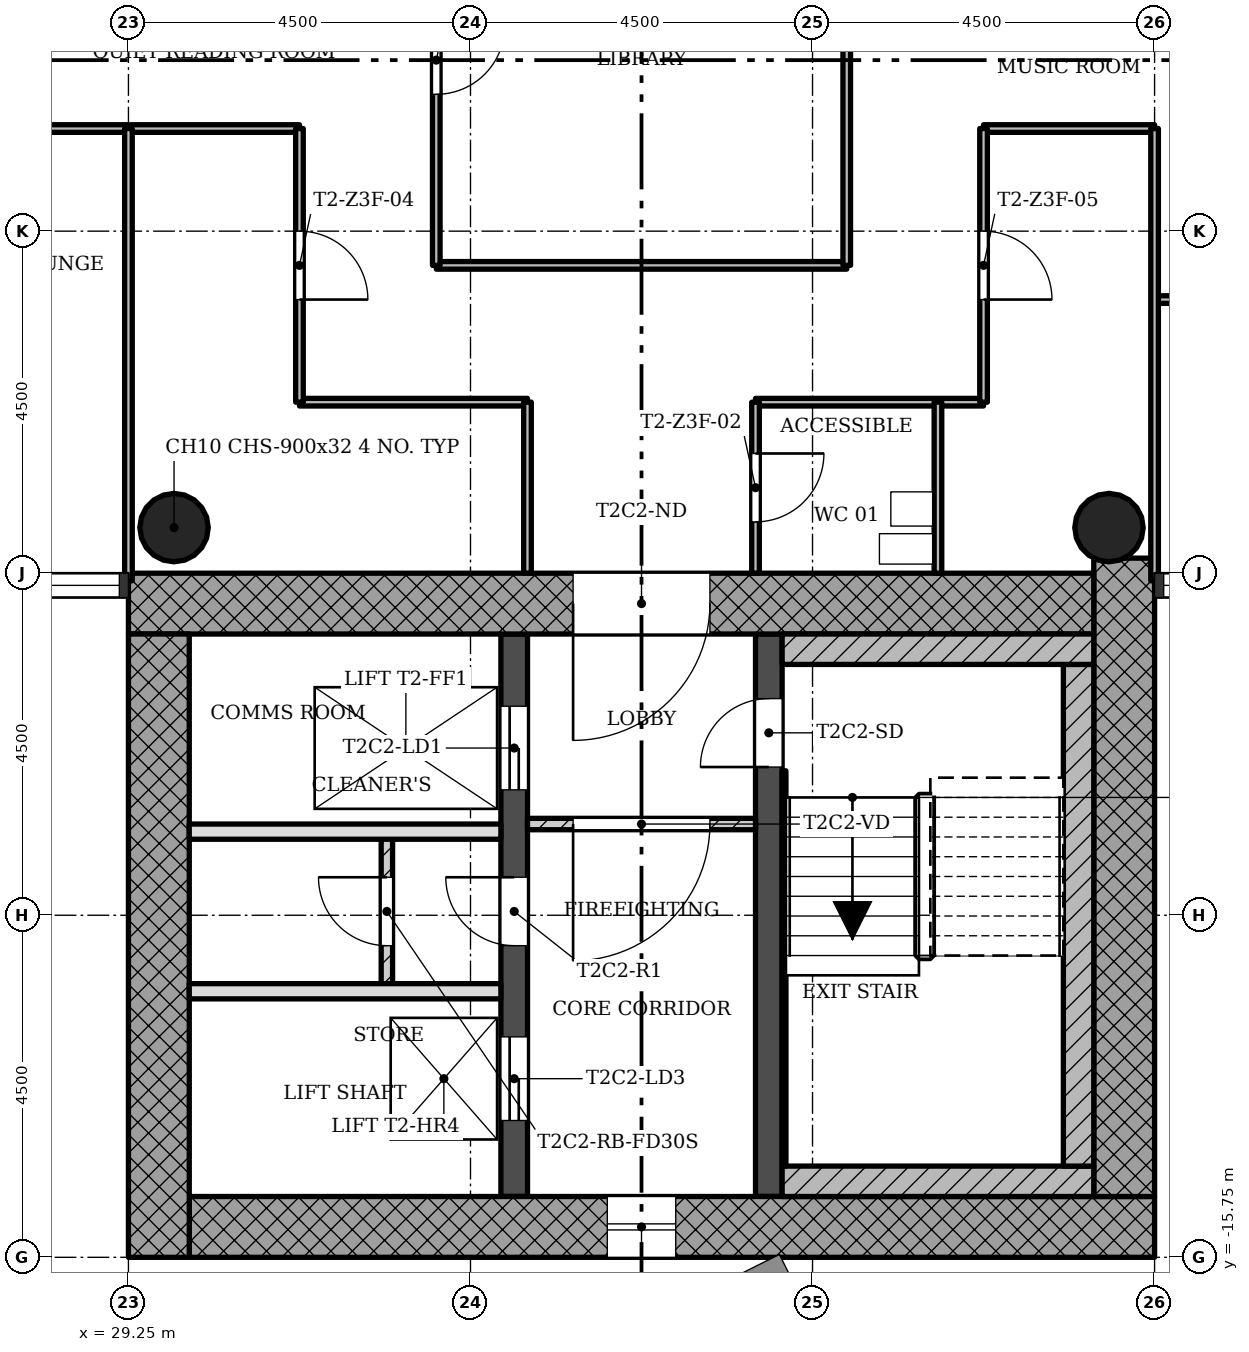
"""IFC4 building model, lengths in metres.
Left out: names, types, materials, properties, quantities, classifications, styles, units other than length and angle.
Written with IfcOpenShell. Run it as: python <this file> out.ifc"""

import sys

from ifc_helpers import new_model, si_unit, direction, frame, frame_2d, origin, origin_2d, place, context, subcontext, project, spatial, rectangle, hollow_circle, extrude, element, fill, save


model = new_model("IFC4")
c1 = context("Model", 3, precision=1e-05, world=origin(), true_north=direction((0.0, 1.0)))
c2 = subcontext(c1, "Body", "Model", "MODEL_VIEW")
j1 = project(units=[si_unit("LENGTHUNIT", "METRE"), si_unit("PLANEANGLEUNIT", "RADIAN")], contexts=[c1])
p1 = place(None, origin())
s1 = spatial("IfcSite", under=j1, at=p1, CompositionType="ELEMENT")
p2 = place(p1, origin())
s2 = spatial("IfcBuilding", under=s1, at=p2, CompositionType="ELEMENT")
p3 = place(p2, frame((0.0, 0.0, 164.3)))
s3 = spatial("IfcBuildingStorey", under=s2, at=p3, CompositionType="ELEMENT", Elevation=164.3)
p4 = place(p3, frame((30.05, -15.35, 0.0), z_axis=(0.0, 0.0, 1.0), x_axis=(1.0, 0.0, 0.0)))
e1 = element("IfcWall", 1, at=p4, inside=s3, PredefinedType="SHEAR", context=c2, shape_type="SweptSolid", body=[
    extrude(rectangle(XDim=12.7, YDim=0.8, at=frame_2d((6.35, 0.0))), origin(), (0.0, 0.0, 1.0), 3.4),
])
p5 = place(p4, frame((5.5, 0.0, 0.45)))
e2 = element("IfcOpeningElement", 2, at=p5, cuts=e1, PredefinedType="OPENING", context=c2, shape_type="SweptSolid", body=[
    extrude(rectangle(XDim=0.9, YDim=2.4, at=frame_2d((0.45, 1.2))), frame((0.0, 0.41, 0.0), z_axis=(0.0, -1.0, 0.0), x_axis=(1.0, 0.0, 0.0)), (0.0, 0.0, 1.0), 0.82),
])
p6 = place(p3, frame((42.35, -14.95, 0.0), z_axis=(0.0, 0.0, 1.0), x_axis=(0.0, 1.0, 0.0)))
e3 = element("IfcWall", 3, at=p6, inside=s3, PredefinedType="SHEAR", context=c2, shape_type="SweptSolid", body=[
    extrude(rectangle(XDim=8.398, YDim=0.8, at=frame_2d((4.199, 0.0))), origin(), (0.0, 0.0, 1.0), 3.4),
])
p7 = place(p3, frame((41.95, -7.15, 0.0), z_axis=(0.0, 0.0, 1.0), x_axis=(-1.0, 0.0, 0.0)))
e4 = element("IfcWall", 4, at=p7, inside=s3, PredefinedType="SHEAR", context=c2, shape_type="SweptSolid", body=[
    extrude(rectangle(XDim=12.7, YDim=0.8, at=frame_2d((6.35, 0.0))), origin(), (0.0, 0.0, 1.0), 3.4),
])
p8 = place(p7, frame((5.05, 0.0, 0.0)))
e5 = element("IfcOpeningElement", 5, at=p8, cuts=e4, PredefinedType="OPENING", context=c2, shape_type="SweptSolid", body=[
    extrude(rectangle(XDim=1.8, YDim=2.1, at=frame_2d((0.9, 1.05))), frame((0.0, 0.41, 0.0), z_axis=(0.0, -1.0, 0.0), x_axis=(1.0, 0.0, 0.0)), (0.0, 0.0, 1.0), 0.82),
])
p9 = place(p3, frame((29.65, -7.55, 0.0), z_axis=(0.0, 0.0, 1.0), x_axis=(0.0, -1.0, 0.0)))
e6 = element("IfcWall", 6, at=p9, inside=s3, PredefinedType="SHEAR", context=c2, shape_type="SweptSolid", body=[
    extrude(rectangle(XDim=8.2, YDim=0.8, at=frame_2d((4.1, 0.0))), origin(), (0.0, 0.0, 1.0), 3.4),
])
p10 = place(p3, frame((34.325, -14.95, 0.0), z_axis=(0.0, 0.0, 1.0), x_axis=(0.0, 1.0, 0.0)))
e7 = element("IfcWall", 7, at=p10, inside=s3, PredefinedType="SHEAR", context=c2, shape_type="SweptSolid", body=[
    extrude(rectangle(XDim=7.4, YDim=0.35, at=frame_2d((3.7, 0.0))), origin(), (0.0, 0.0, 1.0), 3.4),
])
p11 = place(p10, frame((5.35, 0.0, 0.0)))
e8 = element("IfcOpeningElement", 8, at=p11, cuts=e7, PredefinedType="OPENING", context=c2, shape_type="SweptSolid", body=[
    extrude(rectangle(XDim=1.1, YDim=2.1, at=frame_2d((0.55, 1.05))), frame((0.0, 0.185, 0.0), z_axis=(0.0, -1.0, 0.0), x_axis=(1.0, 0.0, 0.0)), (0.0, 0.0, 1.0), 0.37),
])
p12 = place(p10, frame((1.0, 0.0, 0.0)))
e9 = element("IfcOpeningElement", 9, at=p12, cuts=e7, PredefinedType="OPENING", context=c2, shape_type="SweptSolid", body=[
    extrude(rectangle(XDim=1.1, YDim=2.1, at=frame_2d((0.55, 1.05))), frame((0.0, 0.185, 0.0), z_axis=(0.0, -1.0, 0.0), x_axis=(1.0, 0.0, 0.0)), (0.0, 0.0, 1.0), 0.37),
])
p13 = place(p10, frame((3.3, 0.0, 0.0)))
e10 = element("IfcOpeningElement", 10, at=p13, cuts=e7, PredefinedType="OPENING", context=c2, shape_type="SweptSolid", body=[
    extrude(rectangle(XDim=0.9, YDim=2.1, at=frame_2d((0.45, 1.05))), frame((0.0, 0.185, 0.0), z_axis=(0.0, -1.0, 0.0), x_axis=(1.0, 0.0, 0.0)), (0.0, 0.0, 1.0), 0.37),
])
p14 = place(p3, frame((37.675, -14.95, 0.0), z_axis=(0.0, 0.0, 1.0), x_axis=(0.0, 1.0, 0.0)))
e11 = element("IfcWall", 11, at=p14, inside=s3, PredefinedType="SHEAR", context=c2, shape_type="SweptSolid", body=[
    extrude(rectangle(XDim=7.4, YDim=0.35, at=frame_2d((3.7, 0.0))), origin(), (0.0, 0.0, 1.0), 3.4),
])
p15 = place(p14, frame((5.65, 0.0, 0.0)))
e12 = element("IfcOpeningElement", 12, at=p15, cuts=e11, PredefinedType="OPENING", context=c2, shape_type="SweptSolid", body=[
    extrude(rectangle(XDim=0.9, YDim=2.1, at=frame_2d((0.45, 1.05))), frame((0.0, 0.185, 0.0), z_axis=(0.0, -1.0, 0.0), x_axis=(1.0, 0.0, 0.0)), (0.0, 0.0, 1.0), 0.37),
])
for number, where, z_axis, x_axis in (
    (13, (42.15, -6.15, 0.0), (0.0, 0.0, 1.0), (1.0, 0.0, 0.0)),
    (14, (29.85, -6.15, 0.0), (0.0, 0.0, 1.0), (1.0, 0.0, 0.0)),
):
    element("IfcColumn", number, at=place(p3, frame(where, z_axis=z_axis, x_axis=x_axis)), inside=s3, PredefinedType="COLUMN", context=c2, shape_type="SweptSolid", body=[
        extrude(hollow_circle(Radius=0.45, WallThickness=0.032, at=origin_2d()), origin(), (0.0, 0.0, 1.0), 3.4),
    ])
p16 = place(p3, frame((34.5, -10.05, 0.0), z_axis=(0.0, 0.0, 1.0), x_axis=(1.0, 0.0, 0.0)))
e15 = element("IfcWall", 15, at=p16, inside=s3, PredefinedType="PARTITIONING", context=c2, shape_type="SweptSolid", body=[
    extrude(rectangle(XDim=3.0, YDim=0.15, at=frame_2d((1.5, 0.0))), origin(), (0.0, 0.0, 1.0), 3.0),
])
p17 = place(p16, frame((0.6, 0.0, 0.0)))
e16 = element("IfcOpeningElement", 16, at=p17, cuts=e15, PredefinedType="OPENING", context=c2, shape_type="SweptSolid", body=[
    extrude(rectangle(XDim=1.8, YDim=2.1, at=frame_2d((0.9, 1.05))), frame((0.0, 0.085, 0.0), z_axis=(0.0, -1.0, 0.0), x_axis=(1.0, 0.0, 0.0)), (0.0, 0.0, 1.0), 0.17),
])
for number, where, z_axis, x_axis in (
    (17, (30.05, -12.25, 0.0), (0.0, 0.0, 1.0), (1.0, 0.0, 0.0)),
    (18, (30.05, -10.15, 0.0), (0.0, 0.0, 1.0), (1.0, 0.0, 0.0)),
):
    element("IfcWall", number, at=place(p3, frame(where, z_axis=z_axis, x_axis=x_axis)), inside=s3, PredefinedType="SOLIDWALL", context=c2, shape_type="SweptSolid", body=[
        extrude(rectangle(XDim=4.1, YDim=0.2, at=frame_2d((2.05, 0.0))), origin(), (0.0, 0.0, 1.0), 3.0),
    ])
p18 = place(p3, frame((32.65, -10.15, 0.0), z_axis=(0.0, 0.0, 1.0), x_axis=(0.0, -1.0, 0.0)))
e19 = element("IfcWall", 19, at=p18, inside=s3, PredefinedType="PARTITIONING", context=c2, shape_type="SweptSolid", body=[
    extrude(rectangle(XDim=2.1, YDim=0.15, at=frame_2d((1.05, 0.0))), origin(), (0.0, 0.0, 1.0), 3.0),
])
p19 = place(p18, frame((0.6, 0.0, 0.0)))
e20 = element("IfcOpeningElement", 20, at=p19, cuts=e19, PredefinedType="OPENING", context=c2, shape_type="SweptSolid", body=[
    extrude(rectangle(XDim=0.9, YDim=2.1, at=frame_2d((0.45, 1.05))), frame((0.0, 0.085, 0.0), z_axis=(0.0, -1.0, 0.0), x_axis=(1.0, 0.0, 0.0)), (0.0, 0.0, 1.0), 0.17),
])
for number, where, z_axis, x_axis in (
    (21, (40.5, -4.5, 0.0), (0.0, 0.0, 1.0), (-1.0, 0.0, 0.0)),
    (22, (34.5, -4.5, 0.0), (0.0, 0.0, 1.0), (-1.0, 0.0, 0.0)),
):
    element("IfcWall", number, at=place(p3, frame(where, z_axis=z_axis, x_axis=x_axis)), inside=s3, PredefinedType="PARTITIONING", context=c2, shape_type="SweptSolid", body=[
        extrude(rectangle(XDim=3.0, YDim=0.1, at=frame_2d((1.5, 0.0))), origin(), (0.0, 0.0, 1.0), 3.0),
    ])
p20 = place(p3, frame((47.25, -3.15, 0.0), z_axis=(0.0, 0.0, 1.0), x_axis=(-1.0, 0.0, 0.0)))
e23 = element("IfcWall", 23, at=p20, inside=s3, PredefinedType="PARTITIONING", context=c2, shape_type="SweptSolid", body=[
    extrude(rectangle(XDim=4.5, YDim=0.1, at=frame_2d((2.25, 0.0))), origin(), (0.0, 0.0, 1.0), 3.0),
])
p21 = place(p20, frame((1.8, 0.0, 0.0)))
e24 = element("IfcOpeningElement", 24, at=p21, cuts=e23, PredefinedType="OPENING", context=c2, shape_type="SweptSolid", body=[
    extrude(rectangle(XDim=0.9, YDim=2.1, at=frame_2d((0.45, 1.05))), frame((0.0, 0.06, 0.0), z_axis=(0.0, -1.0, 0.0), x_axis=(1.0, 0.0, 0.0)), (0.0, 0.0, 1.0), 0.12),
])
p22 = place(p3, frame((38.7, -2.7, 0.0), z_axis=(0.0, 0.0, 1.0), x_axis=(-1.0, 0.0, 0.0)))
e25 = element("IfcWall", 25, at=p22, inside=s3, PredefinedType="PARTITIONING", context=c2, shape_type="SweptSolid", body=[
    extrude(rectangle(XDim=5.4, YDim=0.1, at=frame_2d((2.7, 0.0))), origin(), (0.0, 0.0, 1.0), 3.0),
])
p23 = place(p3, frame((42.75, -0.9, 0.0), z_axis=(0.0, 0.0, 1.0), x_axis=(-1.0, 0.0, 0.0)))
e26 = element("IfcWall", 26, at=p23, inside=s3, PredefinedType="PARTITIONING", context=c2, shape_type="SweptSolid", body=[
    extrude(rectangle(XDim=2.25, YDim=0.1, at=frame_2d((1.125, 0.0))), origin(), (0.0, 0.0, 1.0), 3.0),
])
p24 = place(p3, frame((31.5, -0.9, 0.0), z_axis=(0.0, 0.0, 1.0), x_axis=(-1.0, 0.0, 0.0)))
e27 = element("IfcWall", 27, at=p24, inside=s3, PredefinedType="PARTITIONING", context=c2, shape_type="SweptSolid", body=[
    extrude(rectangle(XDim=6.75, YDim=0.1, at=frame_2d((3.375, 0.0))), origin(), (0.0, 0.0, 1.0), 3.0),
])
p25 = place(p24, frame((4.05, 0.0, 0.0)))
e28 = element("IfcOpeningElement", 28, at=p25, cuts=e27, PredefinedType="OPENING", context=c2, shape_type="SweptSolid", body=[
    extrude(rectangle(XDim=0.9, YDim=2.1, at=frame_2d((0.45, 1.05))), frame((0.0, 0.06, 0.0), z_axis=(0.0, -1.0, 0.0), x_axis=(1.0, 0.0, 0.0)), (0.0, 0.0, 1.0), 0.12),
])
p26 = place(p3, frame((42.75, -6.85, 0.0), z_axis=(0.0, 0.0, 1.0), x_axis=(0.0, 1.0, 0.0)))
e29 = element("IfcWall", 29, at=p26, inside=s3, PredefinedType="PARTITIONING", context=c2, shape_type="SweptSolid", body=[
    extrude(rectangle(XDim=5.95, YDim=0.1, at=frame_2d((2.975, 0.0))), origin(), (0.0, 0.0, 1.0), 3.0),
])
p27 = place(p3, frame((40.5, -4.5, 0.0), z_axis=(0.0, 0.0, 1.0), x_axis=(0.0, 1.0, 0.0)))
e30 = element("IfcWall", 30, at=p27, inside=s3, PredefinedType="PARTITIONING", context=c2, shape_type="SweptSolid", body=[
    extrude(rectangle(XDim=3.6, YDim=0.1, at=frame_2d((1.8, 0.0))), origin(), (0.0, 0.0, 1.0), 3.0),
])
p28 = place(p27, frame((1.35, 0.0, 0.0)))
e31 = element("IfcOpeningElement", 31, at=p28, cuts=e30, PredefinedType="OPENING", context=c2, shape_type="SweptSolid", body=[
    extrude(rectangle(XDim=0.9, YDim=2.1, at=frame_2d((0.45, 1.05))), frame((0.0, 0.06, 0.0), z_axis=(0.0, -1.0, 0.0), x_axis=(1.0, 0.0, 0.0)), (0.0, 0.0, 1.0), 0.12),
])
p29 = place(p3, frame((39.9, -6.75, 0.0), z_axis=(0.0, 0.0, 1.0), x_axis=(0.0, 1.0, 0.0)))
e32 = element("IfcWall", 32, at=p29, inside=s3, PredefinedType="PARTITIONING", context=c2, shape_type="SweptSolid", body=[
    extrude(rectangle(XDim=2.25, YDim=0.1, at=frame_2d((1.125, 0.0))), origin(), (0.0, 0.0, 1.0), 3.0),
])
p30 = place(p3, frame((38.7, -2.7, 0.0), z_axis=(0.0, 0.0, 1.0), x_axis=(0.0, 1.0, 0.0)))
e33 = element("IfcWall", 33, at=p30, inside=s3, PredefinedType="PARTITIONING", context=c2, shape_type="SweptSolid", body=[
    extrude(rectangle(XDim=5.4, YDim=0.1, at=frame_2d((2.7, 0.0))), origin(), (0.0, 0.0, 1.0), 3.0),
])
p31 = place(p3, frame((37.5, -6.75, 0.0), z_axis=(0.0, 0.0, 1.0), x_axis=(0.0, 1.0, 0.0)))
e34 = element("IfcWall", 34, at=p31, inside=s3, PredefinedType="PARTITIONING", context=c2, shape_type="SweptSolid", body=[
    extrude(rectangle(XDim=2.25, YDim=0.1, at=frame_2d((1.125, 0.0))), origin(), (0.0, 0.0, 1.0), 3.0),
])
p32 = place(p31, frame((0.675, 0.0, 0.0)))
e35 = element("IfcOpeningElement", 35, at=p32, cuts=e34, PredefinedType="OPENING", context=c2, shape_type="SweptSolid", body=[
    extrude(rectangle(XDim=0.9, YDim=2.1, at=frame_2d((0.45, 1.05))), frame((0.0, 0.06, 0.0), z_axis=(0.0, -1.0, 0.0), x_axis=(1.0, 0.0, 0.0)), (0.0, 0.0, 1.0), 0.12),
])
p33 = place(p3, frame((34.5, -6.75, 0.0), z_axis=(0.0, 0.0, 1.0), x_axis=(0.0, 1.0, 0.0)))
e36 = element("IfcWall", 36, at=p33, inside=s3, PredefinedType="PARTITIONING", context=c2, shape_type="SweptSolid", body=[
    extrude(rectangle(XDim=2.25, YDim=0.1, at=frame_2d((1.125, 0.0))), origin(), (0.0, 0.0, 1.0), 3.0),
])
p34 = place(p3, frame((33.3, -2.7, 0.0), z_axis=(0.0, 0.0, 1.0), x_axis=(0.0, 1.0, 0.0)))
e37 = element("IfcWall", 37, at=p34, inside=s3, PredefinedType="PARTITIONING", context=c2, shape_type="SweptSolid", body=[
    extrude(rectangle(XDim=5.4, YDim=0.1, at=frame_2d((2.7, 0.0))), origin(), (0.0, 0.0, 1.0), 3.0),
])
p35 = place(p34, frame((2.25, 0.0, 0.0)))
e38 = element("IfcOpeningElement", 38, at=p35, cuts=e37, PredefinedType="OPENING", context=c2, shape_type="SweptSolid", body=[
    extrude(rectangle(XDim=0.9, YDim=2.1, at=frame_2d((0.45, 1.05))), frame((0.0, 0.06, 0.0), z_axis=(0.0, -1.0, 0.0), x_axis=(1.0, 0.0, 0.0)), (0.0, 0.0, 1.0), 0.12),
])
p36 = place(p3, frame((31.5, -4.5, 0.0), z_axis=(0.0, 0.0, 1.0), x_axis=(0.0, 1.0, 0.0)))
e39 = element("IfcWall", 39, at=p36, inside=s3, PredefinedType="PARTITIONING", context=c2, shape_type="SweptSolid", body=[
    extrude(rectangle(XDim=3.6, YDim=0.1, at=frame_2d((1.8, 0.0))), origin(), (0.0, 0.0, 1.0), 3.0),
])
p37 = place(p36, frame((1.35, 0.0, 0.0)))
e40 = element("IfcOpeningElement", 40, at=p37, cuts=e39, PredefinedType="OPENING", context=c2, shape_type="SweptSolid", body=[
    extrude(rectangle(XDim=0.9, YDim=2.1, at=frame_2d((0.45, 1.05))), frame((0.0, 0.06, 0.0), z_axis=(0.0, -1.0, 0.0), x_axis=(1.0, 0.0, 0.0)), (0.0, 0.0, 1.0), 0.12),
])
p38 = place(p3, frame((29.25, -6.85, 0.0), z_axis=(0.0, 0.0, 1.0), x_axis=(0.0, 1.0, 0.0)))
e41 = element("IfcWall", 41, at=p38, inside=s3, PredefinedType="PARTITIONING", context=c2, shape_type="SweptSolid", body=[
    extrude(rectangle(XDim=5.95, YDim=0.1, at=frame_2d((2.975, 0.0))), origin(), (0.0, 0.0, 1.0), 3.0),
])
p39 = place(p3, frame((37.85, -14.75, 0.0), z_axis=(0.0, 0.0, 1.0), x_axis=(1.0, 0.0, 0.0)))
e42 = element("IfcWall", 42, at=p39, inside=s3, PredefinedType="SHEAR", context=c2, shape_type="SweptSolid", body=[
    extrude(rectangle(XDim=4.1, YDim=0.4, at=frame_2d((2.05, 0.0))), origin(), (0.0, 0.0, 1.0), 3.4),
])
p40 = place(p3, frame((41.75, -7.95, 0.0), z_axis=(0.0, 0.0, 1.0), x_axis=(0.0, -1.0, 0.0)))
e43 = element("IfcWall", 43, at=p40, inside=s3, PredefinedType="SHEAR", context=c2, shape_type="SweptSolid", body=[
    extrude(rectangle(XDim=6.6, YDim=0.4, at=frame_2d((3.3, 0.0))), origin(), (0.0, 0.0, 1.0), 3.4),
])
p41 = place(p3, frame((37.85, -7.75, 0.0), z_axis=(0.0, 0.0, 1.0), x_axis=(1.0, 0.0, 0.0)))
e44 = element("IfcWall", 44, at=p41, inside=s3, PredefinedType="SHEAR", context=c2, shape_type="SweptSolid", body=[
    extrude(rectangle(XDim=4.1, YDim=0.4, at=frame_2d((2.05, 0.0))), origin(), (0.0, 0.0, 1.0), 3.4),
])
p42 = place(p3, frame((37.875, -9.35, 0.0), z_axis=(0.0, 0.0, 1.0), x_axis=(0.0, -1.0, 0.0)))
e45 = element("IfcWall", 45, at=p42, inside=s3, PredefinedType="SHEAR", context=c2, shape_type="SweptSolid", body=[
    extrude(rectangle(XDim=5.2, YDim=0.05, at=frame_2d((2.6, 0.0))), origin(), (0.0, 0.0, 1.0), 3.4),
])
p43 = place(p5, origin())
e46 = element("IfcWindow", 46, at=p43, inside=s3, PartitioningType="SINGLE_PANEL", PredefinedType="WINDOW", context=c2, shape_type="SweptSolid", body=[
    extrude(rectangle(XDim=0.9, YDim=2.4, at=frame_2d((0.45, 1.2))), frame((0.0, 0.03, 0.0), z_axis=(0.0, -1.0, 0.0), x_axis=(1.0, 0.0, 0.0)), (0.0, 0.0, 1.0), 0.06),
])
fill(e2, e46)
p44 = place(p17, origin())
e47 = element("IfcDoor", 47, at=p44, inside=s3, OperationType="SINGLE_SWING_LEFT", PredefinedType="DOOR", context=c2, shape_type="SweptSolid", body=[
    extrude(rectangle(XDim=1.8, YDim=2.1, at=frame_2d((0.9, 1.05))), frame((0.0, 0.025, 0.0), z_axis=(0.0, -1.0, 0.0), x_axis=(1.0, 0.0, 0.0)), (0.0, 0.0, 1.0), 0.05),
])
fill(e16, e47)
p45 = place(p19, origin())
e48 = element("IfcDoor", 48, at=p45, inside=s3, OperationType="SINGLE_SWING_LEFT", PredefinedType="DOOR", context=c2, shape_type="SweptSolid", body=[
    extrude(rectangle(XDim=0.9, YDim=2.1, at=frame_2d((0.45, 1.05))), frame((0.0, 0.025, 0.0), z_axis=(0.0, -1.0, 0.0), x_axis=(1.0, 0.0, 0.0)), (0.0, 0.0, 1.0), 0.05),
])
fill(e20, e48)
p46 = place(p35, origin())
e49 = element("IfcDoor", 49, at=p46, inside=s3, OperationType="SINGLE_SWING_RIGHT", PredefinedType="DOOR", context=c2, shape_type="SweptSolid", body=[
    extrude(rectangle(XDim=0.9, YDim=2.1, at=frame_2d((0.45, 1.05))), frame((0.0, 0.025, 0.0), z_axis=(0.0, -1.0, 0.0), x_axis=(1.0, 0.0, 0.0)), (0.0, 0.0, 1.0), 0.05),
])
fill(e38, e49)
p47 = place(p32, origin())
e50 = element("IfcDoor", 50, at=p47, inside=s3, OperationType="SINGLE_SWING_RIGHT", PredefinedType="DOOR", context=c2, shape_type="SweptSolid", body=[
    extrude(rectangle(XDim=0.9, YDim=2.1, at=frame_2d((0.45, 1.05))), frame((0.0, 0.025, 0.0), z_axis=(0.0, -1.0, 0.0), x_axis=(1.0, 0.0, 0.0)), (0.0, 0.0, 1.0), 0.05),
])
fill(e35, e50)
p48 = place(p37, origin())
e51 = element("IfcDoor", 51, at=p48, inside=s3, OperationType="SINGLE_SWING_LEFT", PredefinedType="DOOR", context=c2, shape_type="SweptSolid", body=[
    extrude(rectangle(XDim=0.9, YDim=2.1, at=frame_2d((0.45, 1.05))), frame((0.0, 0.025, 0.0), z_axis=(0.0, -1.0, 0.0), x_axis=(1.0, 0.0, 0.0)), (0.0, 0.0, 1.0), 0.05),
])
fill(e40, e51)
p49 = place(p28, origin())
e52 = element("IfcDoor", 52, at=p49, inside=s3, OperationType="SINGLE_SWING_LEFT", PredefinedType="DOOR", context=c2, shape_type="SweptSolid", body=[
    extrude(rectangle(XDim=0.9, YDim=2.1, at=frame_2d((0.45, 1.05))), frame((0.0, 0.025, 0.0), z_axis=(0.0, -1.0, 0.0), x_axis=(1.0, 0.0, 0.0)), (0.0, 0.0, 1.0), 0.05),
])
fill(e31, e52)
p50 = place(p15, origin())
e53 = element("IfcDoor", 53, at=p50, inside=s3, OperationType="SINGLE_SWING_RIGHT", PredefinedType="DOOR", context=c2, shape_type="SweptSolid", body=[
    extrude(rectangle(XDim=0.9, YDim=2.1, at=frame_2d((0.45, 1.05))), frame((0.0, 0.025, 0.0), z_axis=(0.0, -1.0, 0.0), x_axis=(1.0, 0.0, 0.0)), (0.0, 0.0, 1.0), 0.05),
])
fill(e12, e53)
p51 = place(p11, origin())
e54 = element("IfcDoor", 54, at=p51, inside=s3, OperationType="SLIDING_TO_LEFT", PredefinedType="DOOR", context=c2, shape_type="SweptSolid", body=[
    extrude(rectangle(XDim=1.1, YDim=2.1, at=frame_2d((0.55, 1.05))), frame((0.0, 0.025, 0.0), z_axis=(0.0, -1.0, 0.0), x_axis=(1.0, 0.0, 0.0)), (0.0, 0.0, 1.0), 0.05),
])
fill(e8, e54)
p52 = place(p12, origin())
e55 = element("IfcDoor", 55, at=p52, inside=s3, OperationType="SLIDING_TO_LEFT", PredefinedType="DOOR", context=c2, shape_type="SweptSolid", body=[
    extrude(rectangle(XDim=1.1, YDim=2.1, at=frame_2d((0.55, 1.05))), frame((0.0, 0.025, 0.0), z_axis=(0.0, -1.0, 0.0), x_axis=(1.0, 0.0, 0.0)), (0.0, 0.0, 1.0), 0.05),
])
fill(e9, e55)
p53 = place(p13, origin())
e56 = element("IfcDoor", 56, at=p53, inside=s3, OperationType="SINGLE_SWING_LEFT", PredefinedType="DOOR", context=c2, shape_type="SweptSolid", body=[
    extrude(rectangle(XDim=0.9, YDim=2.1, at=frame_2d((0.45, 1.05))), frame((0.0, 0.025, 0.0), z_axis=(0.0, -1.0, 0.0), x_axis=(1.0, 0.0, 0.0)), (0.0, 0.0, 1.0), 0.05),
])
fill(e10, e56)
p54 = place(p8, origin())
e57 = element("IfcDoor", 57, at=p54, inside=s3, OperationType="SINGLE_SWING_LEFT", PredefinedType="DOOR", context=c2, shape_type="SweptSolid", body=[
    extrude(rectangle(XDim=1.8, YDim=2.1, at=frame_2d((0.9, 1.05))), frame((0.0, 0.025, 0.0), z_axis=(0.0, -1.0, 0.0), x_axis=(1.0, 0.0, 0.0)), (0.0, 0.0, 1.0), 0.05),
])
fill(e5, e57)
save(model, sys.argv[1])
